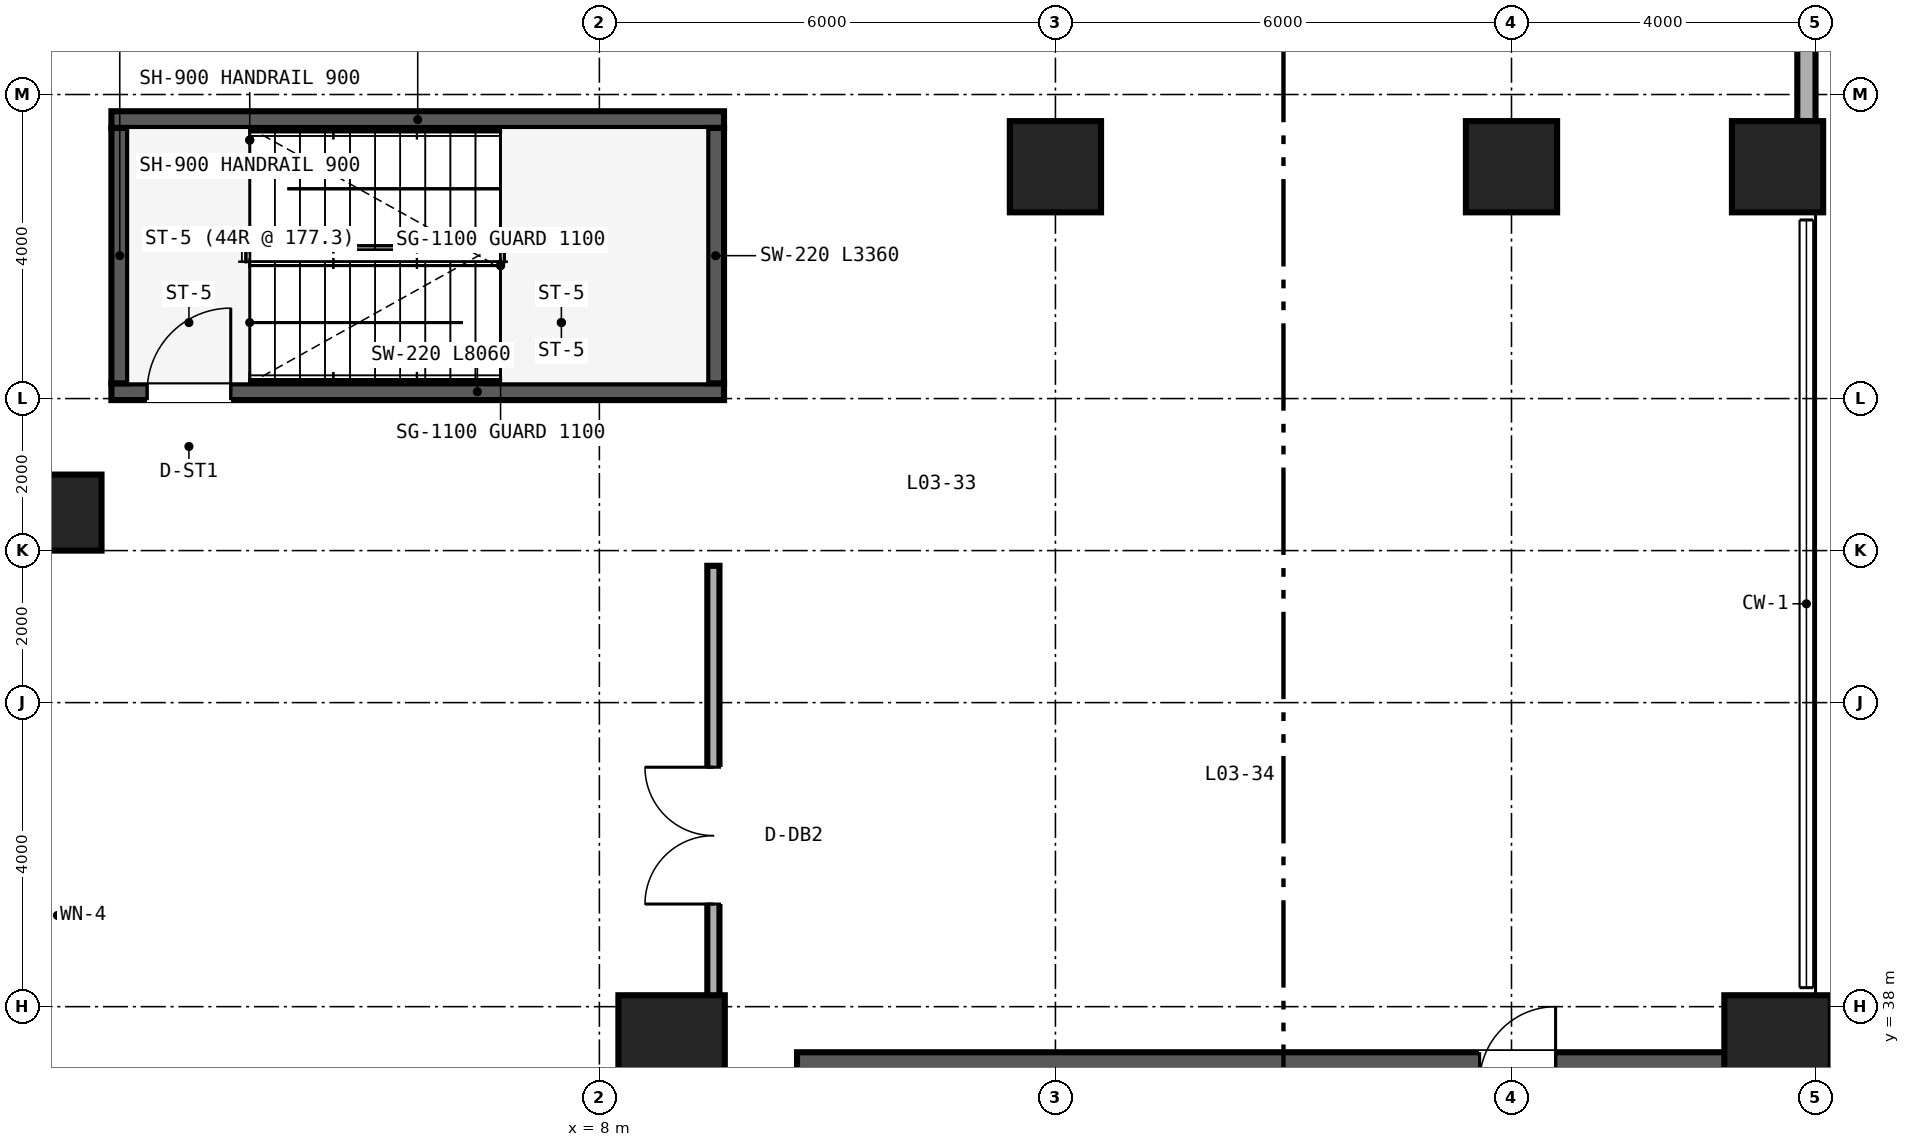
"""IFC4 building model, lengths in metres.
Left out: names, types, materials, properties, quantities, classifications, styles, units other than length and angle.
Written with IfcOpenShell. Run it as: python <this file> out.ifc"""

import sys

from ifc_helpers import new_model, si_unit, direction, frame, frame_2d, origin, origin_2d, place, context, subcontext, project, spatial, rectangle, extrude, source, transform, mapped, element, fill, save


model = new_model("IFC4")
c1 = context("Model", 3, precision=1e-05, world=origin(), true_north=direction((0.0, 1.0)))
c2 = subcontext(c1, "Body", "Model", "MODEL_VIEW")
j1 = project(units=[si_unit("LENGTHUNIT", "METRE"), si_unit("PLANEANGLEUNIT", "RADIAN")], contexts=[c1])
p1 = place(None, origin())
s1 = spatial("IfcSite", under=j1, at=p1, CompositionType="ELEMENT")
p2 = place(p1, origin())
s2 = spatial("IfcBuilding", under=s1, at=p2, CompositionType="ELEMENT")
p3 = place(p2, frame((0.0, 0.0, 11.4)))
s3 = spatial("IfcBuildingStorey", under=s2, at=p3, CompositionType="ELEMENT", Elevation=11.4)
p4 = place(p3, frame((10.6, 37.0, 0.0), z_axis=(0.0, 0.0, 1.0), x_axis=(1.0, 0.0, 0.0)))
e1 = element("IfcWall", 1, at=p4, inside=s3, PredefinedType="SHEAR", context=c2, shape_type="SweptSolid", body=[
    extrude(rectangle(XDim=12.8, YDim=0.8, at=frame_2d((6.4, 0.0))), origin(), (0.0, 0.0, 1.0), 7.51),
])
p5 = place(p4, frame((8.98, 0.0, 0.0)))
e2 = element("IfcOpeningElement", 2, at=p5, cuts=e1, PredefinedType="OPENING", context=c2, shape_type="SweptSolid", body=[
    extrude(rectangle(XDim=1.0, YDim=2.15, at=frame_2d((0.5, 1.075))), frame((0.0, 0.41, 0.0), z_axis=(0.0, -1.0, 0.0), x_axis=(1.0, 0.0, 0.0)), (0.0, 0.0, 1.0), 0.82),
])
p6 = place(p3, frame((1.58, 46.09, 0.0), z_axis=(0.0, 0.0, 1.0), x_axis=(1.0, 0.0, 0.0)))
e3 = element("IfcWall", 3, at=p6, inside=s3, PredefinedType="SHEAR", context=c2, shape_type="SweptSolid", body=[
    extrude(rectangle(XDim=8.06, YDim=0.22, at=frame_2d((4.03, 0.0))), origin(), (0.0, 0.0, 1.0), 7.6),
])
p7 = place(p6, frame((0.47, 0.0, 0.0)))
e4 = element("IfcOpeningElement", 4, at=p7, cuts=e3, PredefinedType="OPENING", context=c2, shape_type="SweptSolid", body=[
    extrude(rectangle(XDim=1.1, YDim=2.15, at=frame_2d((0.55, 1.075))), frame((0.0, 0.12, 0.0), z_axis=(0.0, -1.0, 0.0), x_axis=(1.0, 0.0, 0.0)), (0.0, 0.0, 1.0), 0.24),
])
p8 = place(p3, frame((1.58, 49.67, 0.0), z_axis=(0.0, 0.0, 1.0), x_axis=(1.0, 0.0, 0.0)))
e5 = element("IfcWall", 5, at=p8, inside=s3, PredefinedType="SHEAR", context=c2, shape_type="SweptSolid", body=[
    extrude(rectangle(XDim=8.06, YDim=0.22, at=frame_2d((4.03, 0.0))), origin(), (0.0, 0.0, 1.0), 7.6),
])
for number, where, z_axis, x_axis in (
    (6, (1.69, 46.2, 0.0), (0.0, 0.0, 1.0), (0.0, 1.0, 0.0)),
    (7, (9.53, 46.2, 0.0), (0.0, 0.0, 1.0), (0.0, 1.0, 0.0)),
):
    element("IfcWall", number, at=place(p3, frame(where, z_axis=z_axis, x_axis=x_axis)), inside=s3, PredefinedType="SHEAR", context=c2, shape_type="SweptSolid", body=[
        extrude(rectangle(XDim=3.36, YDim=0.22, at=frame_2d((1.68, 0.0))), origin(), (0.0, 0.0, 1.0), 7.6),
    ])
m1 = source(origin(), c2, "Body", "SweptSolid", [
    extrude(rectangle(XDim=1.0, YDim=1.0, at=origin_2d()), origin(), (0.0, 0.0, 1.0), 7.51),
])
p9 = place(p3, frame((0.95, 44.5, 0.0), z_axis=(0.0, 0.0, 1.0), x_axis=(1.0, 0.0, 0.0)))
e8 = element("IfcColumn", 8, at=p9, inside=s3, PredefinedType="COLUMN", context=c2, shape_type="MappedRepresentation", body=[
    mapped(m1, transform((0.0, 0.0, 0.0), scale=1.0)),
])
m2 = source(origin(), c2, "Body", "SweptSolid", [
    extrude(rectangle(XDim=1.4, YDim=1.4, at=origin_2d()), origin(), (0.0, 0.0, 1.0), 7.51),
])
for number, where, z_axis, x_axis in (
    (9, (8.95, 37.45, 0.0), (0.0, 0.0, 1.0), (1.0, 0.0, 0.0)),
    (10, (23.5, 37.45, 0.0), (0.0, 0.0, 1.0), (1.0, 0.0, 0.0)),
):
    element("IfcColumn", number, at=place(p3, frame(where, z_axis=z_axis, x_axis=x_axis)), inside=s3, PredefinedType="COLUMN", context=c2, shape_type="MappedRepresentation", body=[
        mapped(m2, transform((0.0, 0.0, 0.0), scale=1.0)),
    ])
m3 = source(origin(), c2, "Body", "SweptSolid", [
    extrude(rectangle(XDim=1.2, YDim=1.2, at=origin_2d()), origin(), (0.0, 0.0, 1.0), 7.51),
])
for number, where, z_axis, x_axis in (
    (11, (14.0, 49.05, 0.0), (0.0, 0.0, 1.0), (1.0, 0.0, 0.0)),
    (12, (20.0, 49.05, 0.0), (0.0, 0.0, 1.0), (1.0, 0.0, 0.0)),
    (13, (23.5, 49.05, 0.0), (0.0, 0.0, 1.0), (1.0, 0.0, 0.0)),
):
    element("IfcColumn", number, at=place(p3, frame(where, z_axis=z_axis, x_axis=x_axis)), inside=s3, PredefinedType="COLUMN", context=c2, shape_type="MappedRepresentation", body=[
        mapped(m3, transform((0.0, 0.0, 0.0), scale=1.0)),
    ])
p10 = place(p3, frame((23.88, 49.65, 0.0), z_axis=(0.0, 0.0, 1.0), x_axis=(0.0, 1.0, 0.0)))
e14 = element("IfcWall", 14, at=p10, inside=s3, PredefinedType="SOLIDWALL", context=c2, shape_type="SweptSolid", body=[
    extrude(rectangle(XDim=2.05, YDim=0.24, at=frame_2d((1.025, 0.0))), origin(), (0.0, 0.0, 1.0), 6.583),
])
p11 = place(p3, frame((9.5, 12.2, 0.0), z_axis=(0.0, 0.0, 1.0), x_axis=(0.0, 1.0, 0.0)))
e15 = element("IfcWall", 15, at=p11, inside=s3, PredefinedType="PARTITIONING", context=c2, shape_type="SweptSolid", body=[
    extrude(rectangle(XDim=31.6, YDim=0.16, at=frame_2d((15.8, 0.0))), origin(), (0.0, 0.0, 1.0), 6.583),
])
p12 = place(p11, frame((5.0, 0.0, 0.0)))
e16 = element("IfcOpeningElement", 16, at=p12, cuts=e15, PredefinedType="OPENING", context=c2, shape_type="SweptSolid", body=[
    extrude(rectangle(XDim=1.8, YDim=2.35, at=frame_2d((0.9, 1.175))), frame((0.0, 0.09, 0.0), z_axis=(0.0, -1.0, 0.0), x_axis=(1.0, 0.0, 0.0)), (0.0, 0.0, 1.0), 0.18),
])
p13 = place(p11, frame((27.15, 0.0, 0.0)))
e17 = element("IfcOpeningElement", 17, at=p13, cuts=e15, PredefinedType="OPENING", context=c2, shape_type="SweptSolid", body=[
    extrude(rectangle(XDim=1.8, YDim=2.35, at=frame_2d((0.9, 1.175))), frame((0.0, 0.09, 0.0), z_axis=(0.0, -1.0, 0.0), x_axis=(1.0, 0.0, 0.0)), (0.0, 0.0, 1.0), 0.18),
])
m4 = source(origin(), c2, "Body", "SweptSolid", [
    extrude(rectangle(XDim=1.1, YDim=2.15, at=frame_2d((0.55, 1.075))), frame((0.0, 0.025, 0.0), z_axis=(0.0, -1.0, 0.0), x_axis=(1.0, 0.0, 0.0)), (0.0, 0.0, 1.0), 0.05),
])
p14 = place(p7, origin())
e18 = element("IfcDoor", 18, at=p14, inside=s3, OperationType="SINGLE_SWING_RIGHT", PredefinedType="DOOR", context=c2, shape_type="MappedRepresentation", body=[
    mapped(m4, transform((0.0, 0.0, 0.0), scale=1.0)),
])
fill(e4, e18)
m5 = source(origin(), c2, "Body", "SweptSolid", [
    extrude(rectangle(XDim=1.8, YDim=2.35, at=frame_2d((0.9, 1.175))), frame((0.0, 0.025, 0.0), z_axis=(0.0, -1.0, 0.0), x_axis=(1.0, 0.0, 0.0)), (0.0, 0.0, 1.0), 0.05),
])
p15 = place(p13, origin())
e19 = element("IfcDoor", 19, at=p15, inside=s3, OperationType="DOUBLE_DOOR_SINGLE_SWING", PredefinedType="DOOR", context=c2, shape_type="MappedRepresentation", body=[
    mapped(m5, transform((0.0, 0.0, 0.0), scale=1.0)),
])
fill(e17, e19)
save(model, sys.argv[1])
